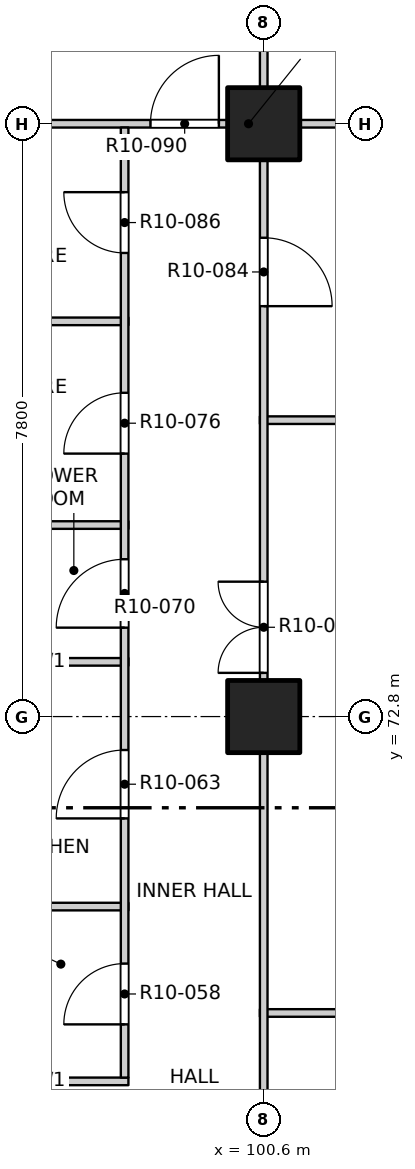
"""IFC4 building model, lengths in metres.
Left out: names, types, materials, properties, quantities, classifications, styles, units other than length and angle.
Written with IfcOpenShell. Run it as: python <this file> out.ifc"""

import sys

from ifc_helpers import new_model, si_unit, direction, frame, frame_2d, origin, origin_2d, place, context, subcontext, project, spatial, rectangle, extrude, element, fill, save


model = new_model("IFC4")
c1 = context("Model", 3, precision=1e-05, world=origin(), true_north=direction((0.0, 1.0)))
c2 = subcontext(c1, "Body", "Model", "MODEL_VIEW")
j1 = project(units=[si_unit("LENGTHUNIT", "METRE"), si_unit("PLANEANGLEUNIT", "RADIAN")], contexts=[c1])
p1 = place(None, origin())
s1 = spatial("IfcSite", under=j1, at=p1, CompositionType="ELEMENT")
p2 = place(p1, origin())
s2 = spatial("IfcBuilding", under=s1, at=p2, CompositionType="ELEMENT")
p3 = place(p2, frame((0.0, 0.0, 127.1)))
s3 = spatial("IfcBuildingStorey", under=s2, at=p3, CompositionType="ELEMENT", Elevation=127.1)
for number, where, z_axis, x_axis in (
    (1, (100.6, 72.8, -0.25), (0.0, 0.0, 1.0), (1.0, 0.0, 0.0)),
    (2, (100.6, 80.6, -0.25), (0.0, 0.0, 1.0), (1.0, 0.0, 0.0)),
):
    element("IfcColumn", number, at=place(p3, frame(where, z_axis=z_axis, x_axis=x_axis)), inside=s3, PredefinedType="COLUMN", context=c2, shape_type="SweptSolid", body=[
        extrude(rectangle(XDim=0.95, YDim=0.95, at=origin_2d()), origin(), (0.0, 0.0, 1.0), 3.4),
    ])
p4 = place(p3, frame((96.6, 68.0, 0.0), z_axis=(0.0, 0.0, 1.0), x_axis=(1.0, 0.0, 0.0)))
e3 = element("IfcWall", 3, at=p4, inside=s3, PredefinedType="PARTITIONING", context=c2, shape_type="SweptSolid", body=[
    extrude(rectangle(XDim=2.22, YDim=0.1, at=frame_2d((1.11, 0.0))), origin(), (0.0, 0.0, 1.0), 3.15),
])
p5 = place(p3, frame((100.55, 68.9, 0.0), z_axis=(0.0, 0.0, 1.0), x_axis=(1.0, 0.0, 0.0)))
e4 = element("IfcWall", 4, at=p5, inside=s3, PredefinedType="PARTITIONING", context=c2, shape_type="SweptSolid", body=[
    extrude(rectangle(XDim=3.65, YDim=0.1, at=frame_2d((1.825, 0.0))), origin(), (0.0, 0.0, 1.0), 2.55),
])
for number, where, z_axis, x_axis in (
    (5, (96.6, 70.3, 0.0), (0.0, 0.0, 1.0), (1.0, 0.0, 0.0)),
    (6, (96.6, 73.52, 0.0), (0.0, 0.0, 1.0), (1.0, 0.0, 0.0)),
    (7, (96.6, 75.32, 0.0), (0.0, 0.0, 1.0), (1.0, 0.0, 0.0)),
):
    element("IfcWall", number, at=place(p3, frame(where, z_axis=z_axis, x_axis=x_axis)), inside=s3, PredefinedType="PARTITIONING", context=c2, shape_type="SweptSolid", body=[
        extrude(rectangle(XDim=2.22, YDim=0.1, at=frame_2d((1.11, 0.0))), origin(), (0.0, 0.0, 1.0), 3.15),
    ])
p6 = place(p3, frame((100.55, 76.7, 0.0), z_axis=(0.0, 0.0, 1.0), x_axis=(1.0, 0.0, 0.0)))
e8 = element("IfcWall", 8, at=p6, inside=s3, PredefinedType="PARTITIONING", context=c2, shape_type="SweptSolid", body=[
    extrude(rectangle(XDim=3.65, YDim=0.1, at=frame_2d((1.825, 0.0))), origin(), (0.0, 0.0, 1.0), 2.55),
])
p7 = place(p3, frame((96.6, 78.0, 0.0), z_axis=(0.0, 0.0, 1.0), x_axis=(1.0, 0.0, 0.0)))
e9 = element("IfcWall", 9, at=p7, inside=s3, PredefinedType="PARTITIONING", context=c2, shape_type="SweptSolid", body=[
    extrude(rectangle(XDim=2.22, YDim=0.1, at=frame_2d((1.11, 0.0))), origin(), (0.0, 0.0, 1.0), 3.15),
])
p8 = place(p3, frame((96.6, 80.6, 0.0), z_axis=(0.0, 0.0, 1.0), x_axis=(1.0, 0.0, 0.0)))
e10 = element("IfcWall", 10, at=p8, inside=s3, PredefinedType="PARTITIONING", context=c2, shape_type="SweptSolid", body=[
    extrude(rectangle(XDim=7.6, YDim=0.1, at=frame_2d((3.8, 0.0))), origin(), (0.0, 0.0, 1.0), 3.15),
])
p9 = place(p8, frame((2.51, 0.0, 0.0)))
e11 = element("IfcOpeningElement", 11, at=p9, cuts=e10, PredefinedType="OPENING", context=c2, shape_type="SweptSolid", body=[
    extrude(rectangle(XDim=0.9, YDim=2.1, at=frame_2d((0.45, 1.05))), frame((0.0, 0.06, 0.0), z_axis=(0.0, -1.0, 0.0), x_axis=(1.0, 0.0, 0.0)), (0.0, 0.0, 1.0), 0.12),
])
p10 = place(p3, frame((98.77, 68.05, 0.0), z_axis=(0.0, 0.0, 1.0), x_axis=(0.0, 1.0, 0.0)))
e12 = element("IfcWall", 12, at=p10, inside=s3, PredefinedType="PARTITIONING", context=c2, shape_type="SweptSolid", body=[
    extrude(rectangle(XDim=12.5, YDim=0.1, at=frame_2d((6.25, 0.0))), origin(), (0.0, 0.0, 1.0), 3.15),
])
p11 = place(p10, frame((0.7, 0.0, 0.0)))
e13 = element("IfcOpeningElement", 13, at=p11, cuts=e12, PredefinedType="OPENING", context=c2, shape_type="SweptSolid", body=[
    extrude(rectangle(XDim=0.8, YDim=2.1, at=frame_2d((0.4, 1.05))), frame((0.0, 0.06, 0.0), z_axis=(0.0, -1.0, 0.0), x_axis=(1.0, 0.0, 0.0)), (0.0, 0.0, 1.0), 0.12),
])
p12 = place(p10, frame((3.41, 0.0, 0.0)))
e14 = element("IfcOpeningElement", 14, at=p12, cuts=e12, PredefinedType="OPENING", context=c2, shape_type="SweptSolid", body=[
    extrude(rectangle(XDim=0.9, YDim=2.1, at=frame_2d((0.45, 1.05))), frame((0.0, 0.06, 0.0), z_axis=(0.0, -1.0, 0.0), x_axis=(1.0, 0.0, 0.0)), (0.0, 0.0, 1.0), 0.12),
])
p13 = place(p10, frame((5.92, 0.0, 0.0)))
e15 = element("IfcOpeningElement", 15, at=p13, cuts=e12, PredefinedType="OPENING", context=c2, shape_type="SweptSolid", body=[
    extrude(rectangle(XDim=0.9, YDim=2.1, at=frame_2d((0.45, 1.05))), frame((0.0, 0.06, 0.0), z_axis=(0.0, -1.0, 0.0), x_axis=(1.0, 0.0, 0.0)), (0.0, 0.0, 1.0), 0.12),
])
p14 = place(p10, frame((8.21, 0.0, 0.0)))
e16 = element("IfcOpeningElement", 16, at=p14, cuts=e12, PredefinedType="OPENING", context=c2, shape_type="SweptSolid", body=[
    extrude(rectangle(XDim=0.8, YDim=2.1, at=frame_2d((0.4, 1.05))), frame((0.0, 0.06, 0.0), z_axis=(0.0, -1.0, 0.0), x_axis=(1.0, 0.0, 0.0)), (0.0, 0.0, 1.0), 0.12),
])
p15 = place(p10, frame((10.85, 0.0, 0.0)))
e17 = element("IfcOpeningElement", 17, at=p15, cuts=e12, PredefinedType="OPENING", context=c2, shape_type="SweptSolid", body=[
    extrude(rectangle(XDim=0.8, YDim=2.1, at=frame_2d((0.4, 1.05))), frame((0.0, 0.06, 0.0), z_axis=(0.0, -1.0, 0.0), x_axis=(1.0, 0.0, 0.0)), (0.0, 0.0, 1.0), 0.12),
])
p16 = place(p3, frame((100.6, 45.8, 0.0), z_axis=(0.0, 0.0, 1.0), x_axis=(0.0, 1.0, 0.0)))
e18 = element("IfcWall", 18, at=p16, inside=s3, PredefinedType="PARTITIONING", context=c2, shape_type="SweptSolid", body=[
    extrude(rectangle(XDim=38.4, YDim=0.1, at=frame_2d((19.2, 0.0))), origin(), (0.0, 0.0, 1.0), 3.15),
])
p17 = place(p16, frame((1.05, 0.0, 0.0)))
e19 = element("IfcOpeningElement", 19, at=p17, cuts=e18, PredefinedType="OPENING", context=c2, shape_type="SweptSolid", body=[
    extrude(rectangle(XDim=1.2, YDim=2.1, at=frame_2d((0.6, 1.05))), frame((0.0, 0.06, 0.0), z_axis=(0.0, -1.0, 0.0), x_axis=(1.0, 0.0, 0.0)), (0.0, 0.0, 1.0), 0.12),
])
p18 = place(p16, frame((6.9, 0.0, 0.0)))
e20 = element("IfcOpeningElement", 20, at=p18, cuts=e18, PredefinedType="OPENING", context=c2, shape_type="SweptSolid", body=[
    extrude(rectangle(XDim=1.2, YDim=2.1, at=frame_2d((0.6, 1.05))), frame((0.0, 0.06, 0.0), z_axis=(0.0, -1.0, 0.0), x_axis=(1.0, 0.0, 0.0)), (0.0, 0.0, 1.0), 0.12),
])
p19 = place(p16, frame((12.9, 0.0, 0.0)))
e21 = element("IfcOpeningElement", 21, at=p19, cuts=e18, PredefinedType="OPENING", context=c2, shape_type="SweptSolid", body=[
    extrude(rectangle(XDim=0.9, YDim=2.1, at=frame_2d((0.45, 1.05))), frame((0.0, 0.06, 0.0), z_axis=(0.0, -1.0, 0.0), x_axis=(1.0, 0.0, 0.0)), (0.0, 0.0, 1.0), 0.12),
])
p20 = place(p16, frame((16.8, 0.0, 0.0)))
e22 = element("IfcOpeningElement", 22, at=p20, cuts=e18, PredefinedType="OPENING", context=c2, shape_type="SweptSolid", body=[
    extrude(rectangle(XDim=0.9, YDim=2.1, at=frame_2d((0.45, 1.05))), frame((0.0, 0.06, 0.0), z_axis=(0.0, -1.0, 0.0), x_axis=(1.0, 0.0, 0.0)), (0.0, 0.0, 1.0), 0.12),
])
p21 = place(p16, frame((20.7, 0.0, 0.0)))
e23 = element("IfcOpeningElement", 23, at=p21, cuts=e18, PredefinedType="OPENING", context=c2, shape_type="SweptSolid", body=[
    extrude(rectangle(XDim=0.9, YDim=2.1, at=frame_2d((0.45, 1.05))), frame((0.0, 0.06, 0.0), z_axis=(0.0, -1.0, 0.0), x_axis=(1.0, 0.0, 0.0)), (0.0, 0.0, 1.0), 0.12),
])
p22 = place(p16, frame((27.575, 0.0, 0.0)))
e24 = element("IfcOpeningElement", 24, at=p22, cuts=e18, PredefinedType="OPENING", context=c2, shape_type="SweptSolid", body=[
    extrude(rectangle(XDim=1.2, YDim=2.1, at=frame_2d((0.6, 1.05))), frame((0.0, 0.06, 0.0), z_axis=(0.0, -1.0, 0.0), x_axis=(1.0, 0.0, 0.0)), (0.0, 0.0, 1.0), 0.12),
])
p23 = place(p16, frame((32.4, 0.0, 0.0)))
e25 = element("IfcOpeningElement", 25, at=p23, cuts=e18, PredefinedType="OPENING", context=c2, shape_type="SweptSolid", body=[
    extrude(rectangle(XDim=0.9, YDim=2.1, at=frame_2d((0.45, 1.05))), frame((0.0, 0.06, 0.0), z_axis=(0.0, -1.0, 0.0), x_axis=(1.0, 0.0, 0.0)), (0.0, 0.0, 1.0), 0.12),
])
p24 = place(p16, frame((36.15, 0.0, 0.0)))
e26 = element("IfcOpeningElement", 26, at=p24, cuts=e18, PredefinedType="OPENING", context=c2, shape_type="SweptSolid", body=[
    extrude(rectangle(XDim=1.2, YDim=2.1, at=frame_2d((0.6, 1.05))), frame((0.0, 0.06, 0.0), z_axis=(0.0, -1.0, 0.0), x_axis=(1.0, 0.0, 0.0)), (0.0, 0.0, 1.0), 0.12),
])
p25 = place(p11, origin())
e27 = element("IfcDoor", 27, at=p25, inside=s3, OperationType="SINGLE_SWING_LEFT", PredefinedType="DOOR", context=c2, shape_type="SweptSolid", body=[
    extrude(rectangle(XDim=0.8, YDim=2.1, at=frame_2d((0.4, 1.05))), frame((0.0, 0.025, 0.0), z_axis=(0.0, -1.0, 0.0), x_axis=(1.0, 0.0, 0.0)), (0.0, 0.0, 1.0), 0.05),
])
fill(e13, e27)
p26 = place(p12, origin())
e28 = element("IfcDoor", 28, at=p26, inside=s3, OperationType="SINGLE_SWING_LEFT", PredefinedType="DOOR", context=c2, shape_type="SweptSolid", body=[
    extrude(rectangle(XDim=0.9, YDim=2.1, at=frame_2d((0.45, 1.05))), frame((0.0, 0.025, 0.0), z_axis=(0.0, -1.0, 0.0), x_axis=(1.0, 0.0, 0.0)), (0.0, 0.0, 1.0), 0.05),
])
fill(e14, e28)
p27 = place(p22, origin())
e29 = element("IfcDoor", 29, at=p27, inside=s3, OperationType="DOUBLE_DOOR_SINGLE_SWING", PredefinedType="DOOR", context=c2, shape_type="SweptSolid", body=[
    extrude(rectangle(XDim=1.2, YDim=2.1, at=frame_2d((0.6, 1.05))), frame((0.0, 0.025, 0.0), z_axis=(0.0, -1.0, 0.0), x_axis=(1.0, 0.0, 0.0)), (0.0, 0.0, 1.0), 0.05),
])
fill(e24, e29)
p28 = place(p13, origin())
e30 = element("IfcDoor", 30, at=p28, inside=s3, OperationType="SINGLE_SWING_LEFT", PredefinedType="DOOR", context=c2, shape_type="SweptSolid", body=[
    extrude(rectangle(XDim=0.9, YDim=2.1, at=frame_2d((0.45, 1.05))), frame((0.0, 0.025, 0.0), z_axis=(0.0, -1.0, 0.0), x_axis=(1.0, 0.0, 0.0)), (0.0, 0.0, 1.0), 0.05),
])
fill(e15, e30)
p29 = place(p14, origin())
e31 = element("IfcDoor", 31, at=p29, inside=s3, OperationType="SINGLE_SWING_LEFT", PredefinedType="DOOR", context=c2, shape_type="SweptSolid", body=[
    extrude(rectangle(XDim=0.8, YDim=2.1, at=frame_2d((0.4, 1.05))), frame((0.0, 0.025, 0.0), z_axis=(0.0, -1.0, 0.0), x_axis=(1.0, 0.0, 0.0)), (0.0, 0.0, 1.0), 0.05),
])
fill(e16, e31)
p30 = place(p23, origin())
e32 = element("IfcDoor", 32, at=p30, inside=s3, OperationType="SINGLE_SWING_RIGHT", PredefinedType="DOOR", context=c2, shape_type="SweptSolid", body=[
    extrude(rectangle(XDim=0.9, YDim=2.1, at=frame_2d((0.45, 1.05))), frame((0.0, 0.025, 0.0), z_axis=(0.0, -1.0, 0.0), x_axis=(1.0, 0.0, 0.0)), (0.0, 0.0, 1.0), 0.05),
])
fill(e25, e32)
p31 = place(p15, origin())
e33 = element("IfcDoor", 33, at=p31, inside=s3, OperationType="SINGLE_SWING_RIGHT", PredefinedType="DOOR", context=c2, shape_type="SweptSolid", body=[
    extrude(rectangle(XDim=0.8, YDim=2.1, at=frame_2d((0.4, 1.05))), frame((0.0, 0.025, 0.0), z_axis=(0.0, -1.0, 0.0), x_axis=(1.0, 0.0, 0.0)), (0.0, 0.0, 1.0), 0.05),
])
fill(e17, e33)
p32 = place(p9, origin())
e34 = element("IfcDoor", 34, at=p32, inside=s3, OperationType="SINGLE_SWING_RIGHT", PredefinedType="DOOR", context=c2, shape_type="SweptSolid", body=[
    extrude(rectangle(XDim=0.9, YDim=2.1, at=frame_2d((0.45, 1.05))), frame((0.0, 0.025, 0.0), z_axis=(0.0, -1.0, 0.0), x_axis=(1.0, 0.0, 0.0)), (0.0, 0.0, 1.0), 0.05),
])
fill(e11, e34)
save(model, sys.argv[1])
